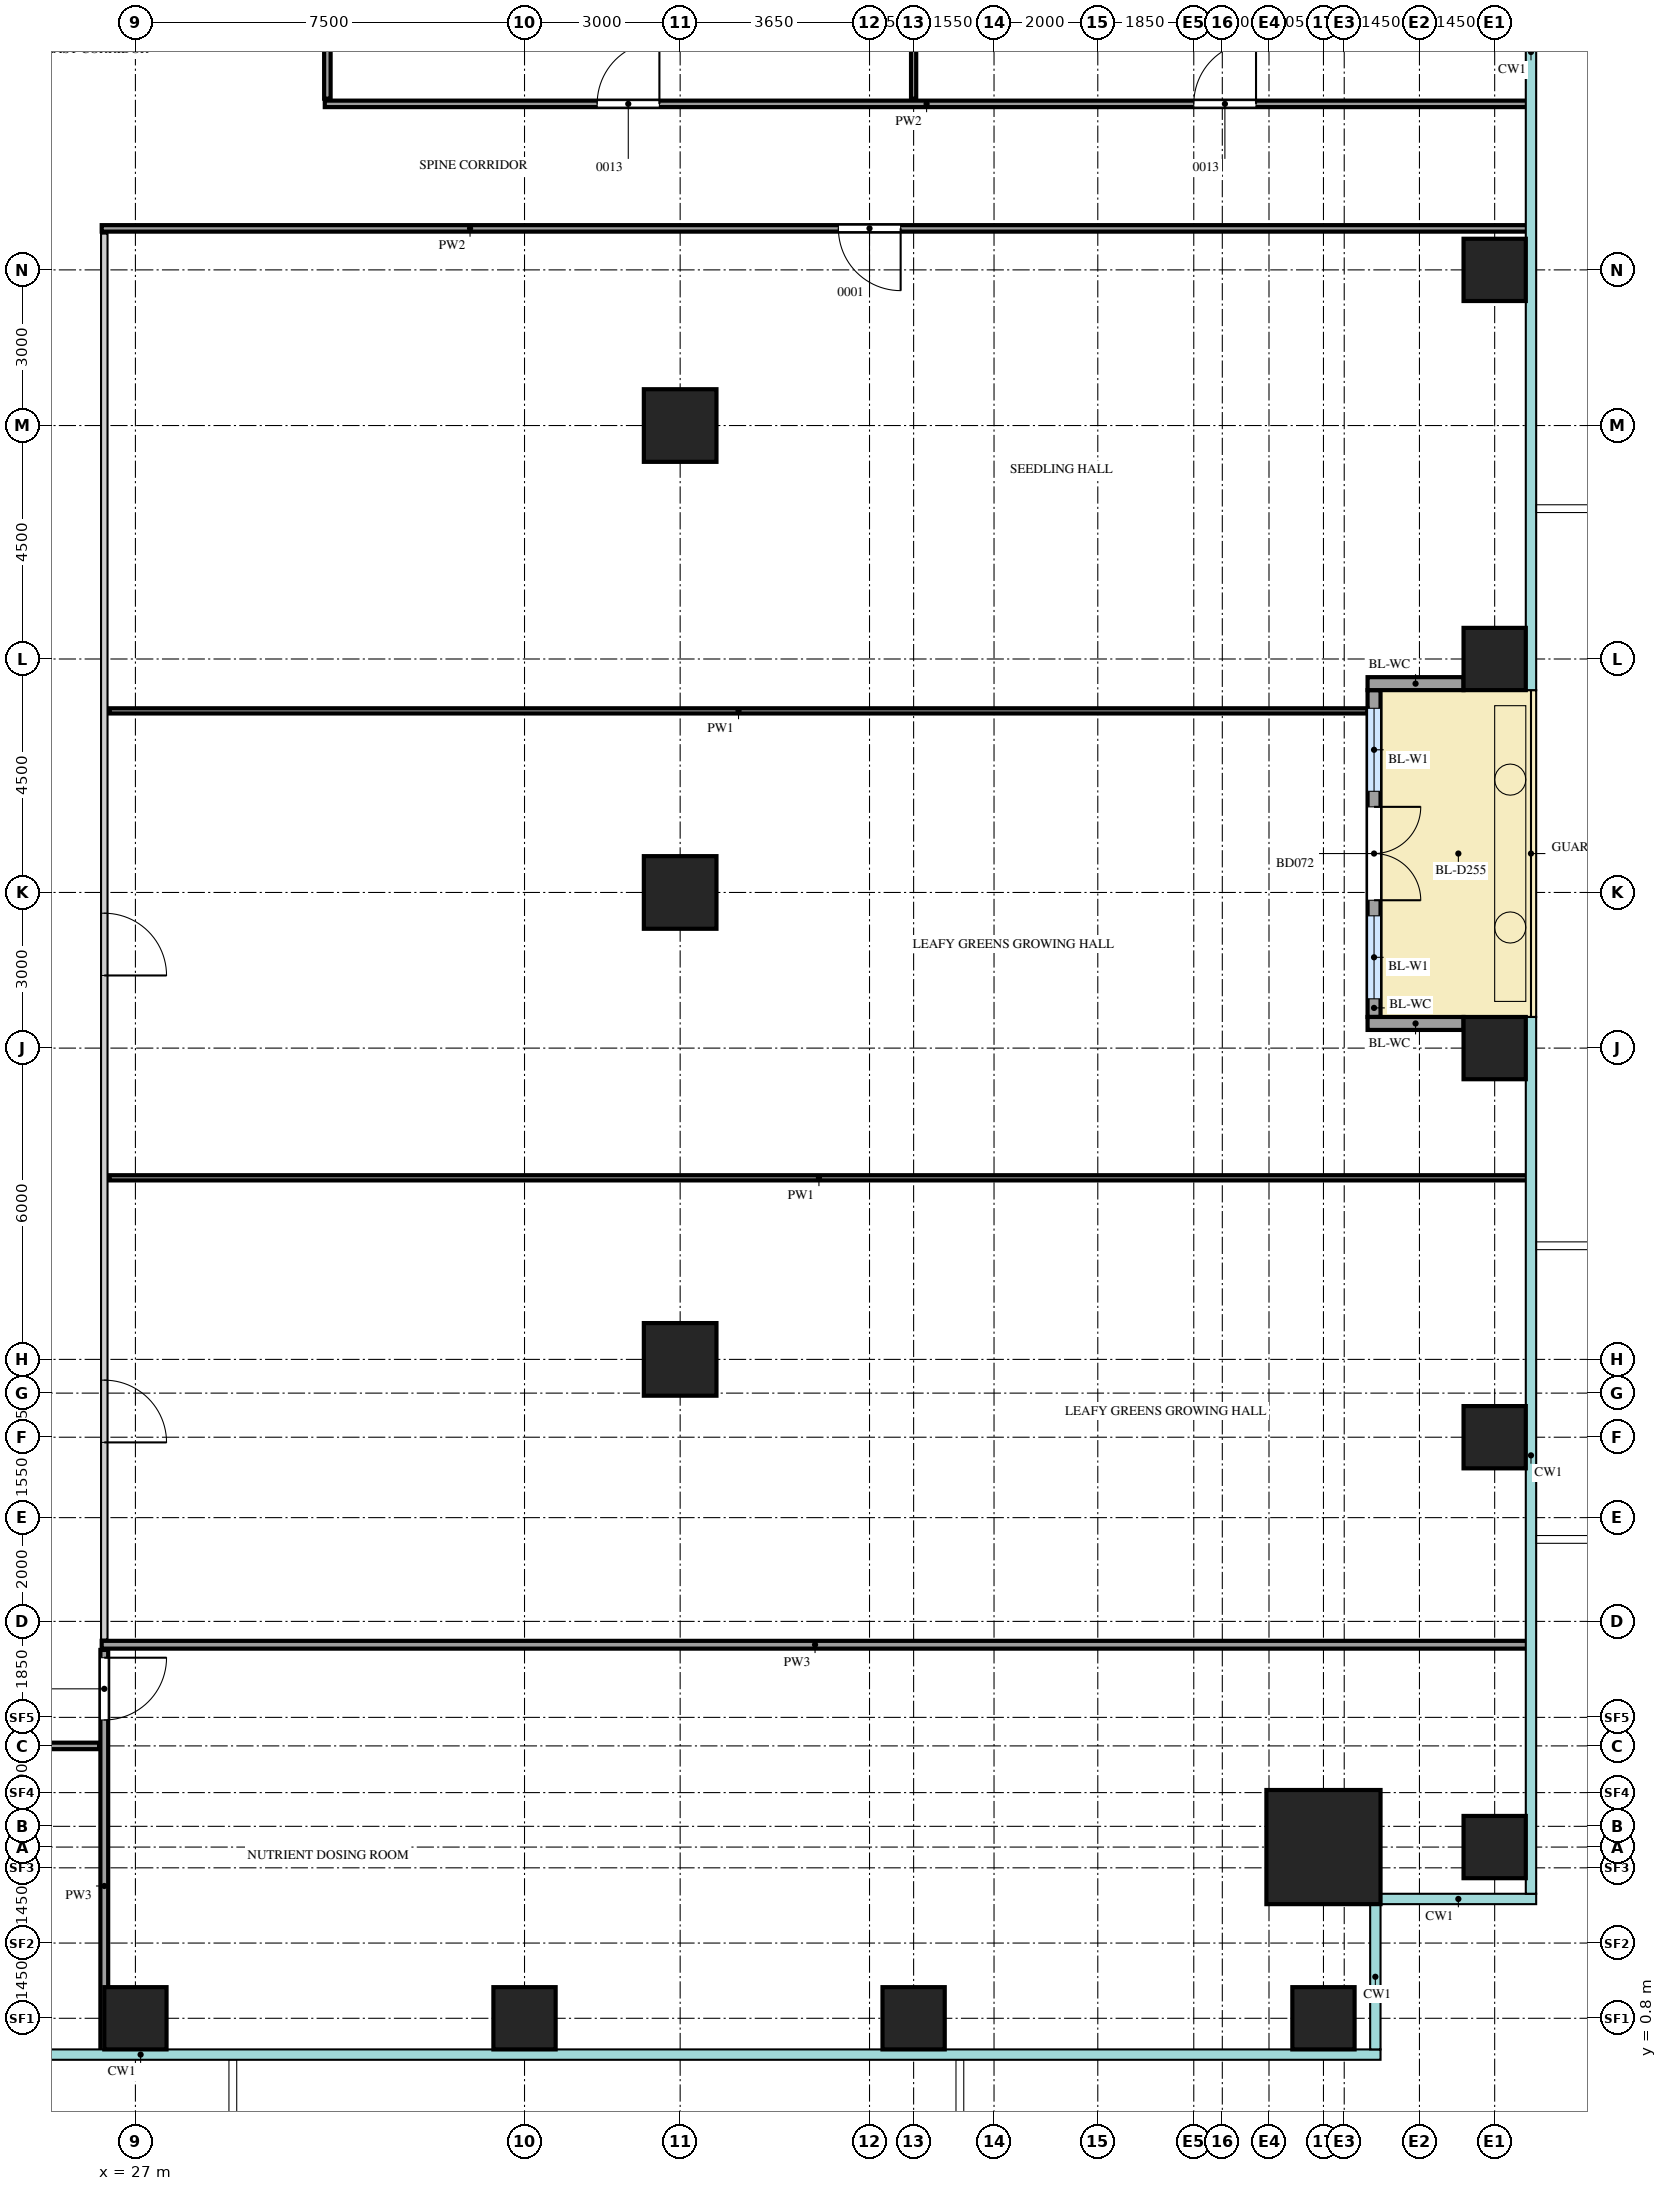
"""IFC4 building model, lengths in metres.
Left out: names, types, materials, properties, quantities, classifications, styles, units other than length and angle.
Written with IfcOpenShell. Run it as: python <this file> out.ifc"""

import sys

from ifc_helpers import new_model, si_unit, direction, frame, frame_2d, origin, origin_2d, place, context, subcontext, project, spatial, rectangle, extrude, source, transform, mapped, element, fill, save


model = new_model("IFC4")
c1 = context("Model", 3, precision=1e-05, world=origin(), true_north=direction((0.0, 1.0)))
c2 = subcontext(c1, "Body", "Model", "MODEL_VIEW")
j1 = project(units=[si_unit("LENGTHUNIT", "METRE"), si_unit("PLANEANGLEUNIT", "RADIAN")], contexts=[c1])
p1 = place(None, origin())
s1 = spatial("IfcSite", under=j1, at=p1, CompositionType="ELEMENT")
p2 = place(p1, origin())
s2 = spatial("IfcBuilding", under=s1, at=p2, CompositionType="ELEMENT")
p3 = place(p2, frame((0.0, 0.0, 37.5)))
s3 = spatial("IfcBuildingStorey", under=s2, at=p3, CompositionType="ELEMENT", Elevation=37.5)
m1 = source(origin(), c2, "Body", "SweptSolid", [
    extrude(rectangle(XDim=2.2, YDim=2.2, at=origin_2d()), origin(), (0.0, 0.0, 1.0), 4.5),
])
p4 = place(p3, frame((49.9, 4.1, 0.0), z_axis=(0.0, 0.0, 1.0), x_axis=(1.0, 0.0, 0.0)))
e1 = element("IfcColumn", 1, at=p4, inside=s3, PredefinedType="COLUMN", context=c2, shape_type="MappedRepresentation", body=[
    mapped(m1, transform((0.0, 0.0, 0.0))),
])
m2 = source(origin(), c2, "Body", "SweptSolid", [
    extrude(rectangle(XDim=1.2, YDim=1.2, at=origin_2d()), origin(), (0.0, 0.0, 1.0), 4.2),
])
for number, where, z_axis, x_axis in (
    (2, (27.0, 0.8, 0.0), (0.0, 0.0, 1.0), (1.0, 0.0, 0.0)),
    (3, (34.5, 0.8, 0.0), (0.0, 0.0, 1.0), (1.0, 0.0, 0.0)),
    (4, (42.0, 0.8, 0.0), (0.0, 0.0, 1.0), (1.0, 0.0, 0.0)),
    (5, (49.9, 0.8, 0.0), (0.0, 0.0, 1.0), (1.0, 0.0, 0.0)),
    (6, (53.2, 4.1, 0.0), (0.0, 0.0, 1.0), (1.0, 0.0, 0.0)),
    (7, (53.2, 12.0, 0.0), (0.0, 0.0, 1.0), (1.0, 0.0, 0.0)),
    (8, (53.2, 19.5, 0.0), (0.0, 0.0, 1.0), (1.0, 0.0, 0.0)),
    (9, (53.2, 27.0, 0.0), (0.0, 0.0, 1.0), (1.0, 0.0, 0.0)),
    (10, (53.2, 34.5, 0.0), (0.0, 0.0, 1.0), (1.0, 0.0, 0.0)),
):
    element("IfcColumn", number, at=place(p3, frame(where, z_axis=z_axis, x_axis=x_axis)), inside=s3, PredefinedType="COLUMN", context=c2, shape_type="MappedRepresentation", body=[
        mapped(m2, transform((0.0, 0.0, 0.0))),
    ])
m3 = source(origin(), c2, "Body", "SweptSolid", [
    extrude(rectangle(XDim=1.4, YDim=1.4, at=origin_2d()), origin(), (0.0, 0.0, 1.0), 4.2),
])
for number, where, z_axis, x_axis in (
    (11, (37.5, 13.5, 0.0), (0.0, 0.0, 1.0), (1.0, 0.0, 0.0)),
    (12, (37.5, 22.5, 0.0), (0.0, 0.0, 1.0), (1.0, 0.0, 0.0)),
    (13, (37.5, 31.5, 0.0), (0.0, 0.0, 1.0), (1.0, 0.0, 0.0)),
):
    element("IfcColumn", number, at=place(p3, frame(where, z_axis=z_axis, x_axis=x_axis)), inside=s3, PredefinedType="COLUMN", context=c2, shape_type="MappedRepresentation", body=[
        mapped(m3, transform((0.0, 0.0, 0.0))),
    ])
m4 = source(origin(), c2, "Body", "SweptSolid", [
    extrude(rectangle(XDim=6.3, YDim=0.25, at=frame_2d((3.15, 0.0))), origin(), (0.0, 0.0, 1.0), 3.6),
])
p5 = place(p3, frame((50.875, 20.1, 0.0), z_axis=(0.0, 0.0, 1.0), x_axis=(0.0, 1.0, 0.0)))
e14 = element("IfcWall", 14, at=p5, inside=s3, PredefinedType="SOLIDWALL", context=c2, shape_type="MappedRepresentation", body=[
    mapped(m4, transform((0.0, 0.0, 0.0))),
])
m5 = source(origin(), c2, "Body", "SweptSolid", [
    extrude(rectangle(XDim=1.6, YDim=2.4, at=frame_2d((0.8, 1.2))), frame((0.0, 0.135, 0.0), z_axis=(0.0, -1.0, 0.0), x_axis=(1.0, 0.0, 0.0)), (0.0, 0.0, 1.0), 0.27),
])
p6 = place(p5, frame((0.35, 0.0, 0.0)))
e15 = element("IfcOpeningElement", 15, at=p6, cuts=e14, PredefinedType="OPENING", context=c2, shape_type="MappedRepresentation", body=[
    mapped(m5, transform((0.0, 0.0, 0.0))),
])
p7 = place(p5, frame((4.35, 0.0, 0.0)))
e16 = element("IfcOpeningElement", 16, at=p7, cuts=e14, PredefinedType="OPENING", context=c2, shape_type="MappedRepresentation", body=[
    mapped(m5, transform((0.0, 0.0, 0.0))),
])
m6 = source(origin(), c2, "Body", "SweptSolid", [
    extrude(rectangle(XDim=1.8, YDim=2.4, at=frame_2d((0.9, 1.2))), frame((0.0, 0.135, 0.0), z_axis=(0.0, -1.0, 0.0), x_axis=(1.0, 0.0, 0.0)), (0.0, 0.0, 1.0), 0.27),
])
p8 = place(p5, frame((2.25, 0.0, 0.0)))
e17 = element("IfcOpeningElement", 17, at=p8, cuts=e14, PredefinedType="OPENING", context=c2, shape_type="MappedRepresentation", body=[
    mapped(m6, transform((0.0, 0.0, 0.0))),
])
m7 = source(origin(), c2, "Body", "SweptSolid", [
    extrude(rectangle(XDim=1.85, YDim=0.25, at=frame_2d((0.925, 0.0))), origin(), (0.0, 0.0, 1.0), 3.6),
])
for number, where, z_axis, x_axis in (
    (18, (52.6, 19.975, 0.0), (0.0, 0.0, 1.0), (-1.0, 0.0, 0.0)),
    (19, (52.6, 26.525, 0.0), (0.0, 0.0, 1.0), (-1.0, 0.0, 0.0)),
):
    element("IfcWall", number, at=place(p3, frame(where, z_axis=z_axis, x_axis=x_axis)), inside=s3, PredefinedType="SOLIDWALL", context=c2, shape_type="MappedRepresentation", body=[
        mapped(m7, transform((0.0, 0.0, 0.0))),
    ])
m8 = source(origin(), c2, "Body", "SweptSolid", [
    extrude(rectangle(XDim=7.75, YDim=0.15, at=frame_2d((3.875, 0.0))), origin(), (0.0, 0.0, 1.0), 4.3),
])
p9 = place(p3, frame((26.4, 0.15, 0.0), z_axis=(0.0, 0.0, 1.0), x_axis=(0.0, 1.0, 0.0)))
e20 = element("IfcWall", 20, at=p9, inside=s3, PredefinedType="PARTITIONING", context=c2, shape_type="MappedRepresentation", body=[
    mapped(m8, transform((0.0, 0.0, 0.0))),
])
m9 = source(origin(), c2, "Body", "SweptSolid", [
    extrude(rectangle(XDim=1.2, YDim=2.1, at=frame_2d((0.6, 1.05))), frame((0.0, 0.085, 0.0), z_axis=(0.0, -1.0, 0.0), x_axis=(1.0, 0.0, 0.0)), (0.0, 0.0, 1.0), 0.17),
])
p10 = place(p9, frame((6.4, 0.0, 0.0)))
e21 = element("IfcOpeningElement", 21, at=p10, cuts=e20, PredefinedType="OPENING", context=c2, shape_type="MappedRepresentation", body=[
    mapped(m9, transform((0.0, 0.0, 0.0))),
])
m10 = source(origin(), c2, "Body", "SweptSolid", [
    extrude(rectangle(XDim=22.15, YDim=0.125, at=frame_2d((11.075, 0.0))), origin(), (0.0, 0.0, 1.0), 4.3),
])
p11 = place(p3, frame((4.15, 6.05, 0.0), z_axis=(0.0, 0.0, 1.0), x_axis=(1.0, 0.0, 0.0)))
e22 = element("IfcWall", 22, at=p11, inside=s3, PredefinedType="PARTITIONING", context=c2, shape_type="MappedRepresentation", body=[
    mapped(m10, transform((0.0, 0.0, 0.0))),
])
m11 = source(origin(), c2, "Body", "SweptSolid", [
    extrude(rectangle(XDim=0.9, YDim=2.1, at=frame_2d((0.45, 1.05))), frame((0.0, 0.073, 0.0), z_axis=(0.0, -1.0, 0.0), x_axis=(1.0, 0.0, 0.0)), (0.0, 0.0, 1.0), 0.145),
])
p12 = place(p11, frame((3.5, 0.0, 0.0)))
e23 = element("IfcOpeningElement", 23, at=p12, cuts=e22, PredefinedType="OPENING", context=c2, shape_type="MappedRepresentation", body=[
    mapped(m11, transform((0.0, 0.0, 0.0))),
])
m12 = source(origin(), c2, "Body", "SweptSolid", [
    extrude(rectangle(XDim=1.2, YDim=2.1, at=frame_2d((0.6, 1.05))), frame((0.0, 0.073, 0.0), z_axis=(0.0, -1.0, 0.0), x_axis=(1.0, 0.0, 0.0)), (0.0, 0.0, 1.0), 0.145),
])
p13 = place(p11, frame((13.25, 0.0, 0.0)))
e24 = element("IfcOpeningElement", 24, at=p13, cuts=e22, PredefinedType="OPENING", context=c2, shape_type="MappedRepresentation", body=[
    mapped(m12, transform((0.0, 0.0, 0.0))),
])
m13 = source(origin(), c2, "Body", "SweptSolid", [
    extrude(rectangle(XDim=27.5, YDim=0.15, at=frame_2d((13.75, 0.0))), origin(), (0.0, 0.0, 1.0), 4.3),
])
p14 = place(p3, frame((26.35, 8.0, 0.0), z_axis=(0.0, 0.0, 1.0), x_axis=(1.0, 0.0, 0.0)))
e25 = element("IfcWall", 25, at=p14, inside=s3, PredefinedType="PARTITIONING", context=c2, shape_type="MappedRepresentation", body=[
    mapped(m13, transform((0.0, 0.0, 0.0))),
])
m14 = source(origin(), c2, "Body", "SweptSolid", [
    extrude(rectangle(XDim=27.1, YDim=0.125, at=frame_2d((13.55, 0.0))), origin(), (0.0, 0.0, 1.0), 4.3),
])
p15 = place(p3, frame((26.4, 8.1, 0.0), z_axis=(0.0, 0.0, 1.0), x_axis=(0.0, 1.0, 0.0)))
e26 = element("IfcWall", 26, at=p15, inside=s3, PredefinedType="PARTITIONING", context=c2, shape_type="MappedRepresentation", body=[
    mapped(m14, transform((0.0, 0.0, 0.0))),
])
p16 = place(p15, frame((3.8, 0.0, 0.0)))
e27 = element("IfcOpeningElement", 27, at=p16, cuts=e26, PredefinedType="OPENING", context=c2, shape_type="MappedRepresentation", body=[
    mapped(m12, transform((0.0, 0.0, 0.0))),
])
p17 = place(p15, frame((12.8, 0.0, 0.0)))
e28 = element("IfcOpeningElement", 28, at=p17, cuts=e26, PredefinedType="OPENING", context=c2, shape_type="MappedRepresentation", body=[
    mapped(m12, transform((0.0, 0.0, 0.0))),
])
m15 = source(origin(), c2, "Body", "SweptSolid", [
    extrude(rectangle(XDim=27.35, YDim=0.1, at=frame_2d((13.675, 0.0))), origin(), (0.0, 0.0, 1.0), 4.3),
])
p18 = place(p3, frame((26.5, 17.0, 0.0), z_axis=(0.0, 0.0, 1.0), x_axis=(1.0, 0.0, 0.0)))
e29 = element("IfcWall", 29, at=p18, inside=s3, PredefinedType="PARTITIONING", context=c2, shape_type="MappedRepresentation", body=[
    mapped(m15, transform((0.0, 0.0, 0.0))),
])
m16 = source(origin(), c2, "Body", "SweptSolid", [
    extrude(rectangle(XDim=24.25, YDim=0.1, at=frame_2d((12.125, 0.0))), origin(), (0.0, 0.0, 1.0), 4.3),
])
p19 = place(p3, frame((26.5, 26.0, 0.0), z_axis=(0.0, 0.0, 1.0), x_axis=(1.0, 0.0, 0.0)))
e30 = element("IfcWall", 30, at=p19, inside=s3, PredefinedType="PARTITIONING", context=c2, shape_type="MappedRepresentation", body=[
    mapped(m16, transform((0.0, 0.0, 0.0))),
])
m17 = source(origin(), c2, "Body", "SweptSolid", [
    extrude(rectangle(XDim=27.5, YDim=0.125, at=frame_2d((13.75, 0.0))), origin(), (0.0, 0.0, 1.0), 4.3),
])
p20 = place(p3, frame((26.35, 35.3, 0.0), z_axis=(0.0, 0.0, 1.0), x_axis=(1.0, 0.0, 0.0)))
e31 = element("IfcWall", 31, at=p20, inside=s3, PredefinedType="PARTITIONING", context=c2, shape_type="MappedRepresentation", body=[
    mapped(m17, transform((0.0, 0.0, 0.0))),
])
p21 = place(p20, frame((14.2, 0.0, 0.0)))
e32 = element("IfcOpeningElement", 32, at=p21, cuts=e31, PredefinedType="OPENING", context=c2, shape_type="MappedRepresentation", body=[
    mapped(m12, transform((0.0, 0.0, 0.0))),
])
m18 = source(origin(), c2, "Body", "SweptSolid", [
    extrude(rectangle(XDim=23.2, YDim=0.125, at=frame_2d((11.6, 0.0))), origin(), (0.0, 0.0, 1.0), 4.3),
])
p22 = place(p3, frame((30.65, 37.7, 0.0), z_axis=(0.0, 0.0, 1.0), x_axis=(1.0, 0.0, 0.0)))
e33 = element("IfcWall", 33, at=p22, inside=s3, PredefinedType="PARTITIONING", context=c2, shape_type="MappedRepresentation", body=[
    mapped(m18, transform((0.0, 0.0, 0.0))),
])
p23 = place(p22, frame((5.25, 0.0, 0.0)))
e34 = element("IfcOpeningElement", 34, at=p23, cuts=e33, PredefinedType="OPENING", context=c2, shape_type="MappedRepresentation", body=[
    mapped(m12, transform((0.0, 0.0, 0.0))),
])
p24 = place(p22, frame((16.75, 0.0, 0.0)))
e35 = element("IfcOpeningElement", 35, at=p24, cuts=e33, PredefinedType="OPENING", context=c2, shape_type="MappedRepresentation", body=[
    mapped(m12, transform((0.0, 0.0, 0.0))),
])
m19 = source(origin(), c2, "Body", "SweptSolid", [
    extrude(rectangle(XDim=10.15, YDim=0.125, at=frame_2d((5.075, 0.0))), origin(), (0.0, 0.0, 1.0), 4.3),
])
p25 = place(p3, frame((30.7, 37.8, 0.0), z_axis=(0.0, 0.0, 1.0), x_axis=(0.0, 1.0, 0.0)))
e36 = element("IfcWall", 36, at=p25, inside=s3, PredefinedType="PARTITIONING", context=c2, shape_type="MappedRepresentation", body=[
    mapped(m19, transform((0.0, 0.0, 0.0))),
])
m20 = source(origin(), c2, "Body", "SweptSolid", [
    extrude(rectangle(XDim=16.05, YDim=0.1, at=frame_2d((8.025, 0.0))), origin(), (0.0, 0.0, 1.0), 3.7),
])
p26 = place(p3, frame((42.0, 37.8, 0.0), z_axis=(0.0, 0.0, 1.0), x_axis=(0.0, 1.0, 0.0)))
e37 = element("IfcWall", 37, at=p26, inside=s3, PredefinedType="PARTITIONING", context=c2, shape_type="MappedRepresentation", body=[
    mapped(m20, transform((0.0, 0.0, 0.0))),
])
m21 = source(origin(), c2, "Body", "SweptSolid", [
    extrude(rectangle(XDim=1.6, YDim=2.4, at=frame_2d((0.8, 1.2))), frame((0.0, 0.03, 0.0), z_axis=(0.0, -1.0, 0.0), x_axis=(1.0, 0.0, 0.0)), (0.0, 0.0, 1.0), 0.06),
])
p27 = place(p6, origin())
e38 = element("IfcWindow", 38, at=p27, inside=s3, PartitioningType="SINGLE_PANEL", PredefinedType="WINDOW", context=c2, shape_type="MappedRepresentation", body=[
    mapped(m21, transform((0.0, 0.0, 0.0))),
])
fill(e15, e38)
p28 = place(p7, origin())
e39 = element("IfcWindow", 39, at=p28, inside=s3, PartitioningType="SINGLE_PANEL", PredefinedType="WINDOW", context=c2, shape_type="MappedRepresentation", body=[
    mapped(m21, transform((0.0, 0.0, 0.0))),
])
fill(e16, e39)
m22 = source(origin(), c2, "Body", "SweptSolid", [
    extrude(rectangle(XDim=1.8, YDim=2.4, at=frame_2d((0.9, 1.2))), frame((0.0, 0.025, 0.0), z_axis=(0.0, -1.0, 0.0), x_axis=(1.0, 0.0, 0.0)), (0.0, 0.0, 1.0), 0.05),
])
p29 = place(p8, origin())
e40 = element("IfcDoor", 40, at=p29, inside=s3, OperationType="DOUBLE_DOOR_DOUBLE_SWING", PredefinedType="DOOR", context=c2, shape_type="MappedRepresentation", body=[
    mapped(m22, transform((0.0, 0.0, 0.0))),
])
fill(e17, e40)
m23 = source(origin(), c2, "Body", "SweptSolid", [
    extrude(rectangle(XDim=1.2, YDim=2.1, at=frame_2d((0.6, 1.05))), frame((0.0, 0.025, 0.0), z_axis=(0.0, -1.0, 0.0), x_axis=(1.0, 0.0, 0.0)), (0.0, 0.0, 1.0), 0.05),
])
p30 = place(p10, origin())
e41 = element("IfcDoor", 41, at=p30, inside=s3, OperationType="SINGLE_SWING_RIGHT", PredefinedType="DOOR", context=c2, shape_type="MappedRepresentation", body=[
    mapped(m23, transform((0.0, 0.0, 0.0))),
])
fill(e21, e41)
p31 = place(p16, origin())
e42 = element("IfcDoor", 42, at=p31, inside=s3, OperationType="SINGLE_SWING_LEFT", PredefinedType="DOOR", context=c2, shape_type="MappedRepresentation", body=[
    mapped(m23, transform((0.0, 0.0, 0.0))),
])
fill(e27, e42)
p32 = place(p17, origin())
e43 = element("IfcDoor", 43, at=p32, inside=s3, OperationType="SINGLE_SWING_LEFT", PredefinedType="DOOR", context=c2, shape_type="MappedRepresentation", body=[
    mapped(m23, transform((0.0, 0.0, 0.0))),
])
fill(e28, e43)
p33 = place(p21, origin())
e44 = element("IfcDoor", 44, at=p33, inside=s3, OperationType="SINGLE_SWING_RIGHT", PredefinedType="DOOR", context=c2, shape_type="MappedRepresentation", body=[
    mapped(m23, transform((0.0, 0.0, 0.0))),
])
fill(e32, e44)
p34 = place(p23, origin())
e45 = element("IfcDoor", 45, at=p34, inside=s3, OperationType="SINGLE_SWING_LEFT", PredefinedType="DOOR", context=c2, shape_type="MappedRepresentation", body=[
    mapped(m23, transform((0.0, 0.0, 0.0))),
])
fill(e34, e45)
p35 = place(p24, origin())
e46 = element("IfcDoor", 46, at=p35, inside=s3, OperationType="SINGLE_SWING_LEFT", PredefinedType="DOOR", context=c2, shape_type="MappedRepresentation", body=[
    mapped(m23, transform((0.0, 0.0, 0.0))),
])
fill(e35, e46)
save(model, sys.argv[1])
